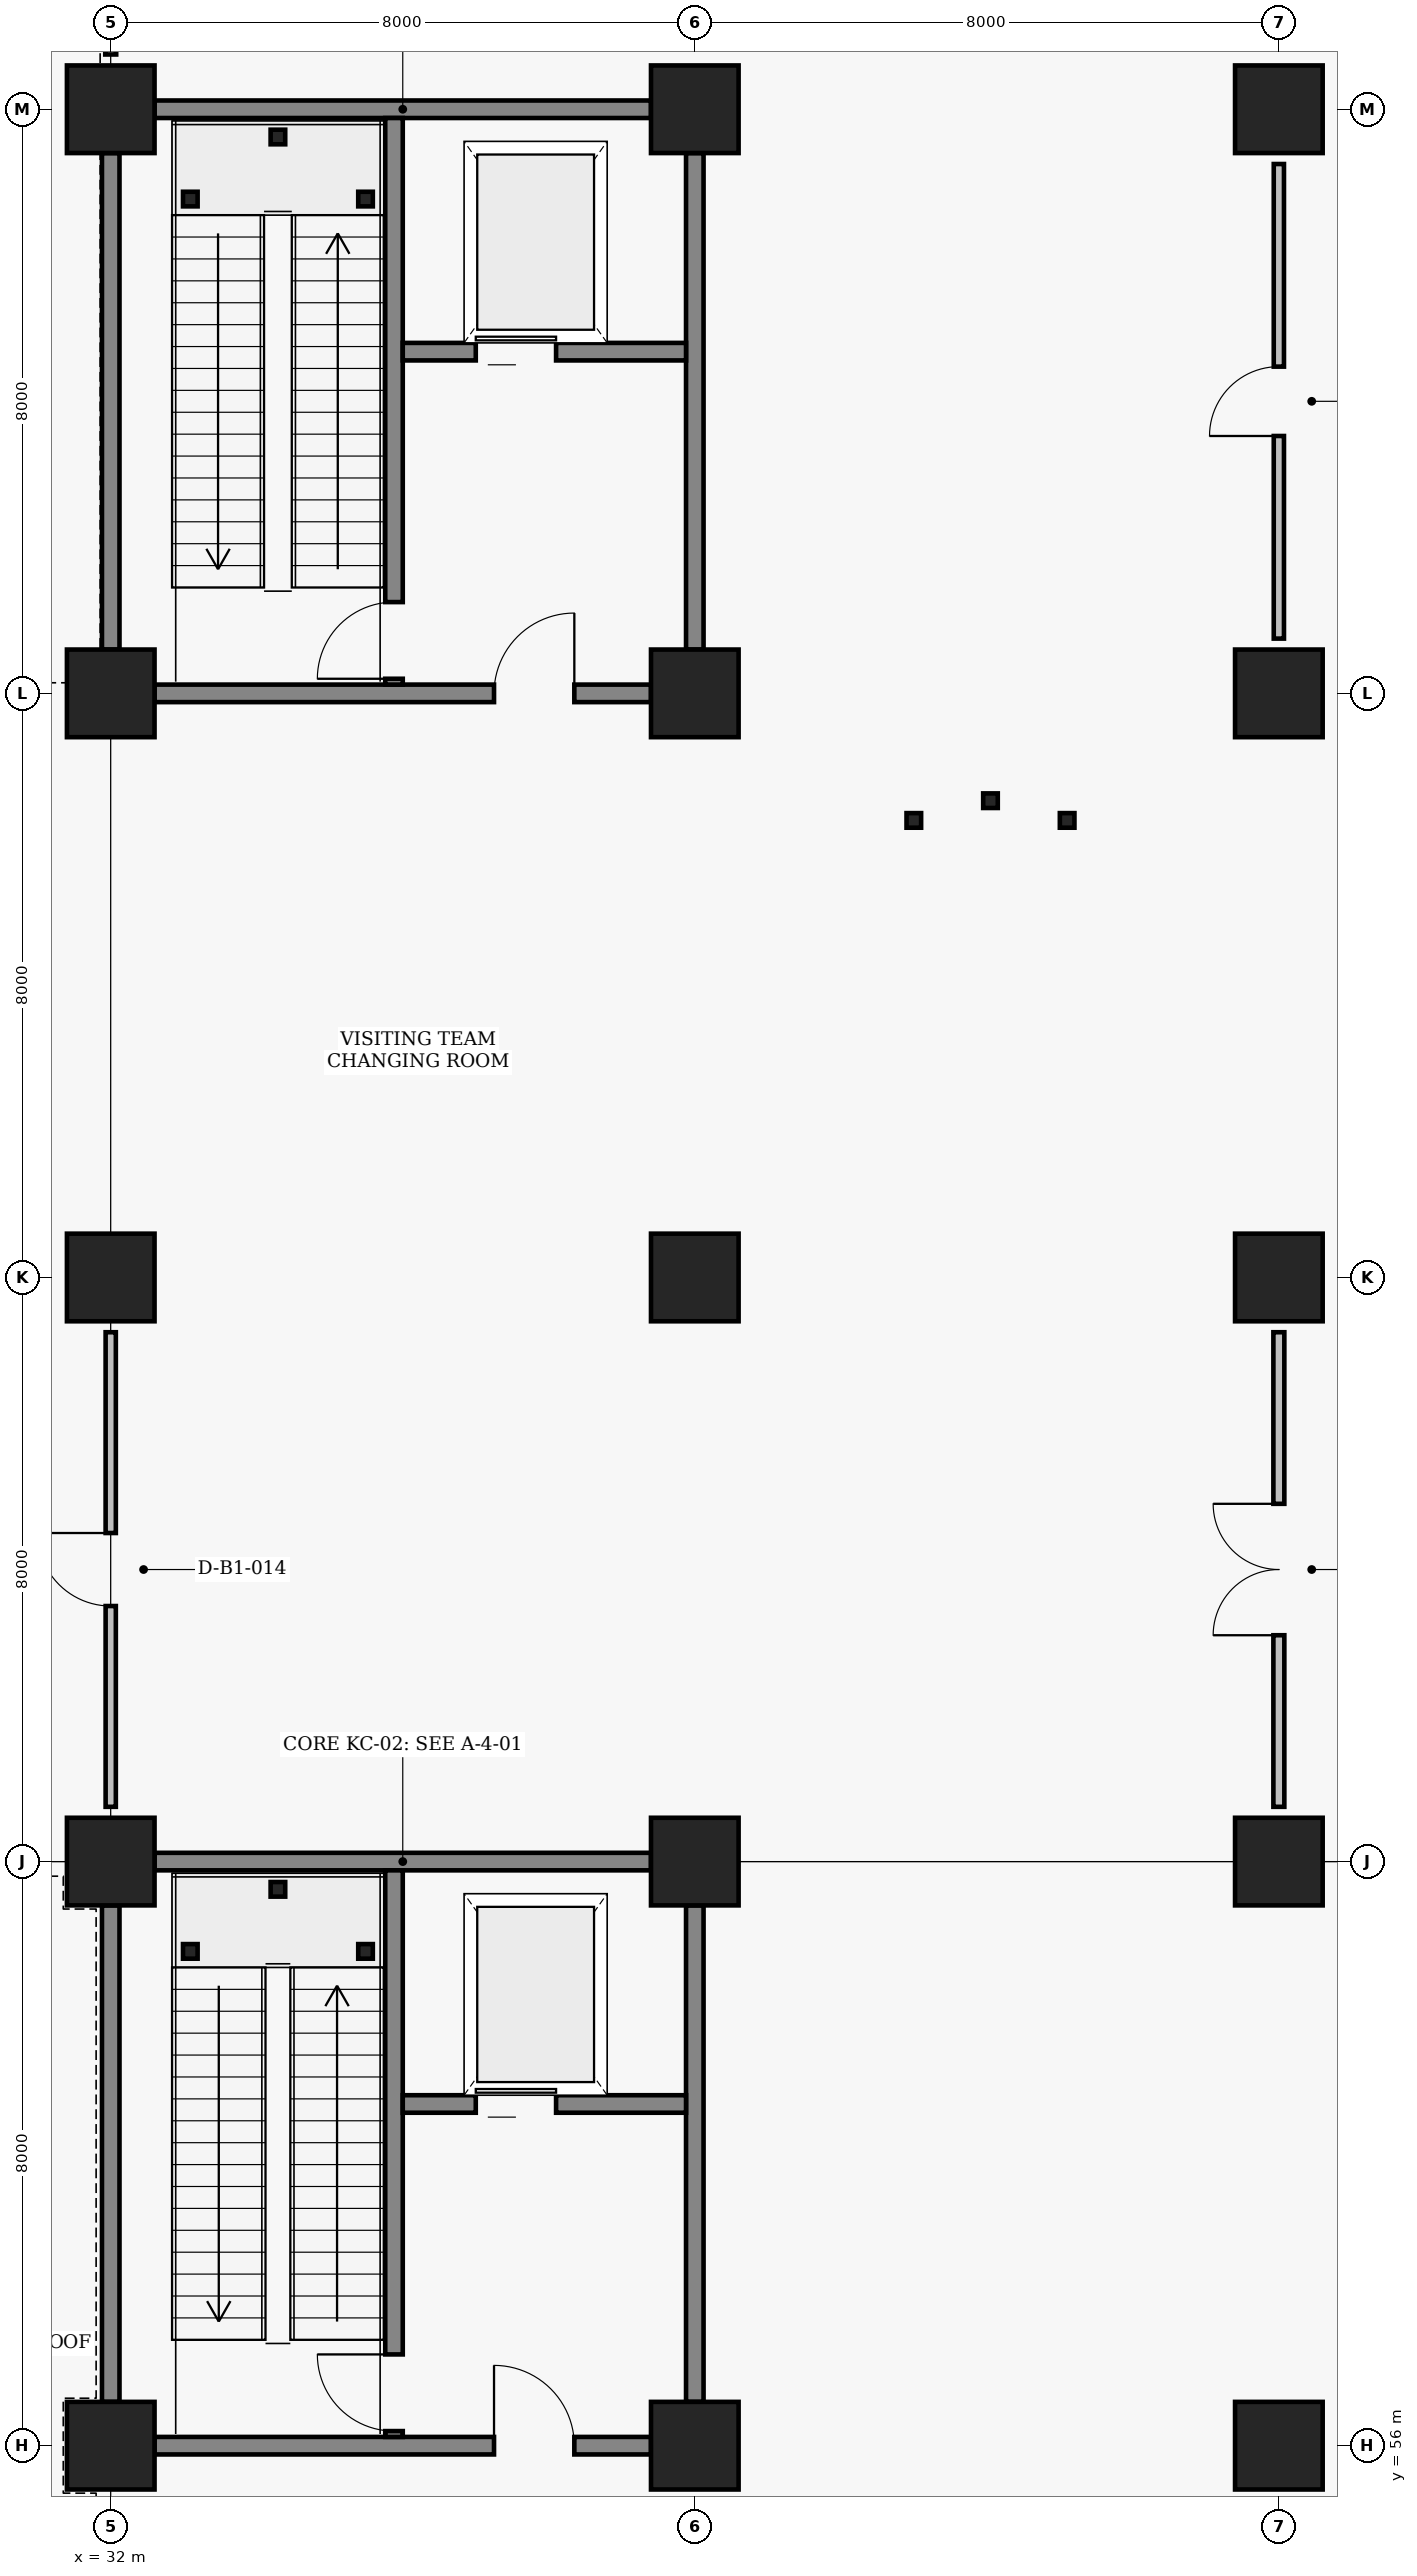
"""IFC4 building model, lengths in metres.
Left out: names, types, materials, properties, quantities, classifications, styles, units other than length and angle.
Written with IfcOpenShell. Run it as: python <this file> out.ifc"""

import sys

from ifc_helpers import new_model, si_unit, direction, frame, frame_2d, origin, origin_2d, place, context, subcontext, project, spatial, rectangle, hollow_rectangle, extrude, element, fill, save


model = new_model("IFC4")
c1 = context("Model", 3, precision=1e-05, world=origin(), true_north=direction((0.0, 1.0)))
c2 = subcontext(c1, "Body", "Model", "MODEL_VIEW")
j1 = project(units=[si_unit("LENGTHUNIT", "METRE"), si_unit("PLANEANGLEUNIT", "RADIAN")], contexts=[c1])
p1 = place(None, origin())
s1 = spatial("IfcSite", under=j1, at=p1, CompositionType="ELEMENT")
p2 = place(p1, origin())
s2 = spatial("IfcBuilding", under=s1, at=p2, CompositionType="ELEMENT")
p3 = place(p2, frame((0.0, 0.0, -5.4)))
s3 = spatial("IfcBuildingStorey", under=s2, at=p3, CompositionType="ELEMENT", Elevation=-5.4)
for number, where, z_axis, x_axis in (
    (1, (32.0, 56.0, 0.0), (0.0, 0.0, 1.0), (1.0, 0.0, 0.0)),
    (2, (32.0, 64.0, 0.0), (0.0, 0.0, 1.0), (1.0, 0.0, 0.0)),
    (3, (32.0, 72.0, 0.0), (0.0, 0.0, 1.0), (1.0, 0.0, 0.0)),
    (4, (32.0, 80.0, 0.0), (0.0, 0.0, 1.0), (1.0, 0.0, 0.0)),
    (5, (32.0, 88.0, 0.0), (0.0, 0.0, 1.0), (1.0, 0.0, 0.0)),
    (6, (40.0, 56.0, 0.0), (0.0, 0.0, 1.0), (1.0, 0.0, 0.0)),
    (7, (40.0, 64.0, 0.0), (0.0, 0.0, 1.0), (1.0, 0.0, 0.0)),
    (8, (40.0, 72.0, 0.0), (0.0, 0.0, 1.0), (1.0, 0.0, 0.0)),
    (9, (40.0, 80.0, 0.0), (0.0, 0.0, 1.0), (1.0, 0.0, 0.0)),
    (10, (40.0, 88.0, 0.0), (0.0, 0.0, 1.0), (1.0, 0.0, 0.0)),
    (11, (48.0, 56.0, 0.0), (0.0, 0.0, 1.0), (1.0, 0.0, 0.0)),
    (12, (48.0, 64.0, 0.0), (0.0, 0.0, 1.0), (1.0, 0.0, 0.0)),
    (13, (48.0, 72.0, 0.0), (0.0, 0.0, 1.0), (1.0, 0.0, 0.0)),
    (14, (48.0, 80.0, 0.0), (0.0, 0.0, 1.0), (1.0, 0.0, 0.0)),
    (15, (48.0, 88.0, 0.0), (0.0, 0.0, 1.0), (1.0, 0.0, 0.0)),
):
    element("IfcColumn", number, at=place(p3, frame(where, z_axis=z_axis, x_axis=x_axis)), inside=s3, PredefinedType="COLUMN", context=c2, shape_type="SweptSolid", body=[
        extrude(rectangle(XDim=1.2, YDim=1.2, at=origin_2d()), origin(), (0.0, 0.0, 1.0), 5.4),
    ])
p4 = place(p3, frame((32.6, 56.0, 0.0), z_axis=(0.0, 0.0, 1.0), x_axis=(1.0, 0.0, 0.0)))
e16 = element("IfcWall", 16, at=p4, inside=s3, PredefinedType="SHEAR", context=c2, shape_type="SweptSolid", body=[
    extrude(rectangle(XDim=6.8, YDim=0.24, at=frame_2d((3.4, 0.0))), origin(), (0.0, 0.0, 1.0), 4.59),
])
p5 = place(p4, frame((4.65, 0.0, 0.0)))
e17 = element("IfcOpeningElement", 17, at=p5, cuts=e16, PredefinedType="OPENING", context=c2, shape_type="SweptSolid", body=[
    extrude(rectangle(XDim=1.1, YDim=2.2, at=frame_2d((0.55, 1.1))), frame((0.0, 0.13, 0.0), z_axis=(0.0, -1.0, 0.0), x_axis=(1.0, 0.0, 0.0)), (0.0, 0.0, 1.0), 0.26),
])
p6 = place(p3, frame((32.6, 64.0, 0.0), z_axis=(0.0, 0.0, 1.0), x_axis=(1.0, 0.0, 0.0)))
e18 = element("IfcWall", 18, at=p6, inside=s3, PredefinedType="SHEAR", context=c2, shape_type="SweptSolid", body=[
    extrude(rectangle(XDim=6.8, YDim=0.24, at=frame_2d((3.4, 0.0))), origin(), (0.0, 0.0, 1.0), 4.59),
])
for number, where, z_axis, x_axis in (
    (19, (32.0, 56.6, 0.0), (0.0, 0.0, 1.0), (0.0, 1.0, 0.0)),
    (20, (40.0, 56.6, 0.0), (0.0, 0.0, 1.0), (0.0, 1.0, 0.0)),
):
    element("IfcWall", number, at=place(p3, frame(where, z_axis=z_axis, x_axis=x_axis)), inside=s3, PredefinedType="SHEAR", context=c2, shape_type="SweptSolid", body=[
        extrude(rectangle(XDim=6.8, YDim=0.24, at=frame_2d((3.4, 0.0))), origin(), (0.0, 0.0, 1.0), 4.39),
    ])
p7 = place(p3, frame((35.88, 56.12, 0.0), z_axis=(0.0, 0.0, 1.0), x_axis=(0.0, 1.0, 0.0)))
e21 = element("IfcWall", 21, at=p7, inside=s3, PredefinedType="SHEAR", context=c2, shape_type="SweptSolid", body=[
    extrude(rectangle(XDim=7.76, YDim=0.24, at=frame_2d((3.88, 0.0))), origin(), (0.0, 0.0, 1.0), 4.59),
])
p8 = place(p7, frame((0.08, 0.0, 0.0)))
e22 = element("IfcOpeningElement", 22, at=p8, cuts=e21, PredefinedType="OPENING", context=c2, shape_type="SweptSolid", body=[
    extrude(rectangle(XDim=1.05, YDim=2.15, at=frame_2d((0.525, 1.075))), frame((0.0, 0.13, 0.0), z_axis=(0.0, -1.0, 0.0), x_axis=(1.0, 0.0, 0.0)), (0.0, 0.0, 1.0), 0.26),
])
p9 = place(p3, frame((36.0, 60.68, 0.0), z_axis=(0.0, 0.0, 1.0), x_axis=(1.0, 0.0, 0.0)))
e23 = element("IfcWall", 23, at=p9, inside=s3, PredefinedType="SHEAR", context=c2, shape_type="SweptSolid", body=[
    extrude(rectangle(XDim=3.88, YDim=0.24, at=frame_2d((1.94, 0.0))), origin(), (0.0, 0.0, 1.0), 4.39),
])
p10 = place(p9, frame((1.0, 0.0, 0.0)))
e24 = element("IfcOpeningElement", 24, at=p10, cuts=e23, PredefinedType="OPENING", context=c2, shape_type="SweptSolid", body=[
    extrude(rectangle(XDim=1.1, YDim=2.15, at=frame_2d((0.55, 1.075))), frame((0.0, 0.13, 0.0), z_axis=(0.0, -1.0, 0.0), x_axis=(1.0, 0.0, 0.0)), (0.0, 0.0, 1.0), 0.26),
])
for number, where, z_axis, x_axis in (
    (25, (33.09, 62.77, 0.0), (0.0, 0.0, 1.0), (1.0, 0.0, 0.0)),
    (26, (35.49, 62.77, 0.0), (0.0, 0.0, 1.0), (1.0, 0.0, 0.0)),
    (27, (34.29, 63.62, 0.0), (0.0, 0.0, 1.0), (1.0, 0.0, 0.0)),
):
    element("IfcColumn", number, at=place(p3, frame(where, z_axis=z_axis, x_axis=x_axis)), inside=s3, PredefinedType="COLUMN", context=c2, shape_type="SweptSolid", body=[
        extrude(hollow_rectangle(XDim=0.2, YDim=0.2, WallThickness=0.009, at=origin_2d()), origin(), (0.0, 0.0, 1.0), 2.5),
    ])
p11 = place(p3, frame((32.6, 80.0, 0.0), z_axis=(0.0, 0.0, 1.0), x_axis=(1.0, 0.0, 0.0)))
e28 = element("IfcWall", 28, at=p11, inside=s3, PredefinedType="SHEAR", context=c2, shape_type="SweptSolid", body=[
    extrude(rectangle(XDim=6.8, YDim=0.24, at=frame_2d((3.4, 0.0))), origin(), (0.0, 0.0, 1.0), 4.59),
])
p12 = place(p11, frame((4.65, 0.0, 0.0)))
e29 = element("IfcOpeningElement", 29, at=p12, cuts=e28, PredefinedType="OPENING", context=c2, shape_type="SweptSolid", body=[
    extrude(rectangle(XDim=1.1, YDim=2.2, at=frame_2d((0.55, 1.1))), frame((0.0, 0.13, 0.0), z_axis=(0.0, -1.0, 0.0), x_axis=(1.0, 0.0, 0.0)), (0.0, 0.0, 1.0), 0.26),
])
for number, where, z_axis, x_axis in (
    (30, (32.6, 88.0, 0.0), (0.0, 0.0, 1.0), (1.0, 0.0, 0.0)),
    (31, (32.0, 80.6, 0.0), (0.0, 0.0, 1.0), (0.0, 1.0, 0.0)),
):
    element("IfcWall", number, at=place(p3, frame(where, z_axis=z_axis, x_axis=x_axis)), inside=s3, PredefinedType="SHEAR", context=c2, shape_type="SweptSolid", body=[
        extrude(rectangle(XDim=6.8, YDim=0.24, at=frame_2d((3.4, 0.0))), origin(), (0.0, 0.0, 1.0), 3.69),
    ])
p13 = place(p3, frame((40.0, 80.6, 0.0), z_axis=(0.0, 0.0, 1.0), x_axis=(0.0, 1.0, 0.0)))
e32 = element("IfcWall", 32, at=p13, inside=s3, PredefinedType="SHEAR", context=c2, shape_type="SweptSolid", body=[
    extrude(rectangle(XDim=6.8, YDim=0.24, at=frame_2d((3.4, 0.0))), origin(), (0.0, 0.0, 1.0), 4.39),
])
p14 = place(p3, frame((35.88, 80.12, 0.0), z_axis=(0.0, 0.0, 1.0), x_axis=(0.0, 1.0, 0.0)))
e33 = element("IfcWall", 33, at=p14, inside=s3, PredefinedType="SHEAR", context=c2, shape_type="SweptSolid", body=[
    extrude(rectangle(XDim=7.76, YDim=0.24, at=frame_2d((3.88, 0.0))), origin(), (0.0, 0.0, 1.0), 4.59),
])
p15 = place(p14, frame((0.08, 0.0, 0.0)))
e34 = element("IfcOpeningElement", 34, at=p15, cuts=e33, PredefinedType="OPENING", context=c2, shape_type="SweptSolid", body=[
    extrude(rectangle(XDim=1.05, YDim=2.15, at=frame_2d((0.525, 1.075))), frame((0.0, 0.13, 0.0), z_axis=(0.0, -1.0, 0.0), x_axis=(1.0, 0.0, 0.0)), (0.0, 0.0, 1.0), 0.26),
])
p16 = place(p3, frame((36.0, 84.68, 0.0), z_axis=(0.0, 0.0, 1.0), x_axis=(1.0, 0.0, 0.0)))
e35 = element("IfcWall", 35, at=p16, inside=s3, PredefinedType="SHEAR", context=c2, shape_type="SweptSolid", body=[
    extrude(rectangle(XDim=3.88, YDim=0.24, at=frame_2d((1.94, 0.0))), origin(), (0.0, 0.0, 1.0), 4.39),
])
p17 = place(p16, frame((1.0, 0.0, 0.0)))
e36 = element("IfcOpeningElement", 36, at=p17, cuts=e35, PredefinedType="OPENING", context=c2, shape_type="SweptSolid", body=[
    extrude(rectangle(XDim=1.1, YDim=2.15, at=frame_2d((0.55, 1.075))), frame((0.0, 0.13, 0.0), z_axis=(0.0, -1.0, 0.0), x_axis=(1.0, 0.0, 0.0)), (0.0, 0.0, 1.0), 0.26),
])
for number, where, z_axis, x_axis in (
    (37, (33.09, 86.77, 0.0), (0.0, 0.0, 1.0), (1.0, 0.0, 0.0)),
    (38, (35.49, 86.77, 0.0), (0.0, 0.0, 1.0), (1.0, 0.0, 0.0)),
    (39, (34.29, 87.62, 0.0), (0.0, 0.0, 1.0), (1.0, 0.0, 0.0)),
):
    element("IfcColumn", number, at=place(p3, frame(where, z_axis=z_axis, x_axis=x_axis)), inside=s3, PredefinedType="COLUMN", context=c2, shape_type="SweptSolid", body=[
        extrude(hollow_rectangle(XDim=0.2, YDim=0.2, WallThickness=0.009, at=origin_2d()), origin(), (0.0, 0.0, 1.0), 2.5),
    ])
for number, where, z_axis, x_axis in (
    (40, (43.0, 78.26, 0.0), (0.0, 0.0, 1.0), (1.0, 0.0, 0.0)),
    (41, (45.1, 78.26, 0.0), (0.0, 0.0, 1.0), (1.0, 0.0, 0.0)),
    (42, (44.05, 78.53, 0.0), (0.0, 0.0, 1.0), (1.0, 0.0, 0.0)),
):
    element("IfcColumn", number, at=place(p3, frame(where, z_axis=z_axis, x_axis=x_axis)), inside=s3, PredefinedType="COLUMN", context=c2, shape_type="SweptSolid", body=[
        extrude(hollow_rectangle(XDim=0.2, YDim=0.2, WallThickness=0.009, at=origin_2d()), origin(), (0.0, 0.0, 1.0), 5.4),
    ])
p18 = place(p3, frame((32.0, 64.75, 0.0), z_axis=(0.0, 0.0, 1.0), x_axis=(0.0, 1.0, 0.0)))
e43 = element("IfcWall", 43, at=p18, inside=s3, PredefinedType="MOVABLE", context=c2, shape_type="SweptSolid", body=[
    extrude(rectangle(XDim=6.5, YDim=0.14, at=frame_2d((3.25, 0.0))), origin(), (0.0, 0.0, 1.0), 4.39),
])
p19 = place(p18, frame((2.75, 0.0, 0.0)))
e44 = element("IfcOpeningElement", 44, at=p19, cuts=e43, PredefinedType="OPENING", context=c2, shape_type="SweptSolid", body=[
    extrude(rectangle(XDim=1.0, YDim=2.1, at=frame_2d((0.5, 1.05))), frame((0.0, 0.08, 0.0), z_axis=(0.0, -1.0, 0.0), x_axis=(1.0, 0.0, 0.0)), (0.0, 0.0, 1.0), 0.16),
])
p20 = place(p3, frame((32.0, 88.75, 0.0), z_axis=(0.0, 0.0, 1.0), x_axis=(0.0, 1.0, 0.0)))
e45 = element("IfcWall", 45, at=p20, inside=s3, PredefinedType="PARTITIONING", context=c2, shape_type="SweptSolid", body=[
    extrude(rectangle(XDim=6.5, YDim=0.15, at=frame_2d((3.25, 0.0))), origin(), (0.0, 0.0, 1.0), 3.69),
])
p21 = place(p20, frame((2.35, 0.0, 0.0)))
e46 = element("IfcOpeningElement", 46, at=p21, cuts=e45, PredefinedType="OPENING", context=c2, shape_type="SweptSolid", body=[
    extrude(rectangle(XDim=1.8, YDim=2.3, at=frame_2d((0.9, 1.15))), frame((0.0, 0.085, 0.0), z_axis=(0.0, -1.0, 0.0), x_axis=(1.0, 0.0, 0.0)), (0.0, 0.0, 1.0), 0.17),
])
p22 = place(p3, frame((48.0, 64.75, 0.0), z_axis=(0.0, 0.0, 1.0), x_axis=(0.0, 1.0, 0.0)))
e47 = element("IfcWall", 47, at=p22, inside=s3, PredefinedType="PARTITIONING", context=c2, shape_type="SweptSolid", body=[
    extrude(rectangle(XDim=6.5, YDim=0.15, at=frame_2d((3.25, 0.0))), origin(), (0.0, 0.0, 1.0), 3.69),
])
p23 = place(p22, frame((2.35, 0.0, 0.0)))
e48 = element("IfcOpeningElement", 48, at=p23, cuts=e47, PredefinedType="OPENING", context=c2, shape_type="SweptSolid", body=[
    extrude(rectangle(XDim=1.8, YDim=2.3, at=frame_2d((0.9, 1.15))), frame((0.0, 0.085, 0.0), z_axis=(0.0, -1.0, 0.0), x_axis=(1.0, 0.0, 0.0)), (0.0, 0.0, 1.0), 0.17),
])
p24 = place(p3, frame((48.0, 80.75, 0.0), z_axis=(0.0, 0.0, 1.0), x_axis=(0.0, 1.0, 0.0)))
e49 = element("IfcWall", 49, at=p24, inside=s3, PredefinedType="MOVABLE", context=c2, shape_type="SweptSolid", body=[
    extrude(rectangle(XDim=6.5, YDim=0.14, at=frame_2d((3.25, 0.0))), origin(), (0.0, 0.0, 1.0), 4.39),
])
p25 = place(p24, frame((2.775, 0.0, 0.0)))
e50 = element("IfcOpeningElement", 50, at=p25, cuts=e49, PredefinedType="OPENING", context=c2, shape_type="SweptSolid", body=[
    extrude(rectangle(XDim=0.95, YDim=2.1, at=frame_2d((0.475, 1.05))), frame((0.0, 0.08, 0.0), z_axis=(0.0, -1.0, 0.0), x_axis=(1.0, 0.0, 0.0)), (0.0, 0.0, 1.0), 0.16),
])
p26 = place(p5, origin())
e51 = element("IfcDoor", 51, at=p26, inside=s3, OperationType="SINGLE_SWING_LEFT", PredefinedType="DOOR", context=c2, shape_type="SweptSolid", body=[
    extrude(rectangle(XDim=1.1, YDim=2.2, at=frame_2d((0.55, 1.1))), frame((0.0, 0.025, 0.0), z_axis=(0.0, -1.0, 0.0), x_axis=(1.0, 0.0, 0.0)), (0.0, 0.0, 1.0), 0.05),
])
fill(e17, e51)
p27 = place(p8, origin())
e52 = element("IfcDoor", 52, at=p27, inside=s3, OperationType="SINGLE_SWING_RIGHT", PredefinedType="DOOR", context=c2, shape_type="SweptSolid", body=[
    extrude(rectangle(XDim=1.05, YDim=2.15, at=frame_2d((0.525, 1.075))), frame((0.0, 0.025, 0.0), z_axis=(0.0, -1.0, 0.0), x_axis=(1.0, 0.0, 0.0)), (0.0, 0.0, 1.0), 0.05),
])
fill(e22, e52)
p28 = place(p10, origin())
e53 = element("IfcDoor", 53, at=p28, inside=s3, OperationType="SLIDING_TO_LEFT", PredefinedType="DOOR", context=c2, shape_type="SweptSolid", body=[
    extrude(rectangle(XDim=1.1, YDim=2.15, at=frame_2d((0.55, 1.075))), frame((0.0, 0.025, 0.0), z_axis=(0.0, -1.0, 0.0), x_axis=(1.0, 0.0, 0.0)), (0.0, 0.0, 1.0), 0.05),
])
fill(e24, e53)
p29 = place(p12, origin())
e54 = element("IfcDoor", 54, at=p29, inside=s3, OperationType="SINGLE_SWING_RIGHT", PredefinedType="DOOR", context=c2, shape_type="SweptSolid", body=[
    extrude(rectangle(XDim=1.1, YDim=2.2, at=frame_2d((0.55, 1.1))), frame((0.0, 0.025, 0.0), z_axis=(0.0, -1.0, 0.0), x_axis=(1.0, 0.0, 0.0)), (0.0, 0.0, 1.0), 0.05),
])
fill(e29, e54)
p30 = place(p15, origin())
e55 = element("IfcDoor", 55, at=p30, inside=s3, OperationType="SINGLE_SWING_LEFT", PredefinedType="DOOR", context=c2, shape_type="SweptSolid", body=[
    extrude(rectangle(XDim=1.05, YDim=2.15, at=frame_2d((0.525, 1.075))), frame((0.0, 0.025, 0.0), z_axis=(0.0, -1.0, 0.0), x_axis=(1.0, 0.0, 0.0)), (0.0, 0.0, 1.0), 0.05),
])
fill(e34, e55)
p31 = place(p17, origin())
e56 = element("IfcDoor", 56, at=p31, inside=s3, OperationType="SLIDING_TO_LEFT", PredefinedType="DOOR", context=c2, shape_type="SweptSolid", body=[
    extrude(rectangle(XDim=1.1, YDim=2.15, at=frame_2d((0.55, 1.075))), frame((0.0, 0.025, 0.0), z_axis=(0.0, -1.0, 0.0), x_axis=(1.0, 0.0, 0.0)), (0.0, 0.0, 1.0), 0.05),
])
fill(e36, e56)
p32 = place(p19, origin())
e57 = element("IfcDoor", 57, at=p32, inside=s3, OperationType="SINGLE_SWING_RIGHT", PredefinedType="DOOR", context=c2, shape_type="SweptSolid", body=[
    extrude(rectangle(XDim=1.0, YDim=2.1, at=frame_2d((0.5, 1.05))), frame((0.0, 0.025, 0.0), z_axis=(0.0, -1.0, 0.0), x_axis=(1.0, 0.0, 0.0)), (0.0, 0.0, 1.0), 0.05),
])
fill(e44, e57)
p33 = place(p23, origin())
e58 = element("IfcDoor", 58, at=p33, inside=s3, OperationType="DOUBLE_SWING_LEFT", PredefinedType="DOOR", context=c2, shape_type="SweptSolid", body=[
    extrude(rectangle(XDim=1.8, YDim=2.3, at=frame_2d((0.9, 1.15))), frame((0.0, 0.025, 0.0), z_axis=(0.0, -1.0, 0.0), x_axis=(1.0, 0.0, 0.0)), (0.0, 0.0, 1.0), 0.05),
])
fill(e48, e58)
p34 = place(p25, origin())
e59 = element("IfcDoor", 59, at=p34, inside=s3, OperationType="SINGLE_SWING_LEFT", PredefinedType="DOOR", context=c2, shape_type="SweptSolid", body=[
    extrude(rectangle(XDim=0.95, YDim=2.1, at=frame_2d((0.475, 1.05))), frame((0.0, 0.025, 0.0), z_axis=(0.0, -1.0, 0.0), x_axis=(1.0, 0.0, 0.0)), (0.0, 0.0, 1.0), 0.05),
])
fill(e50, e59)
save(model, sys.argv[1])
